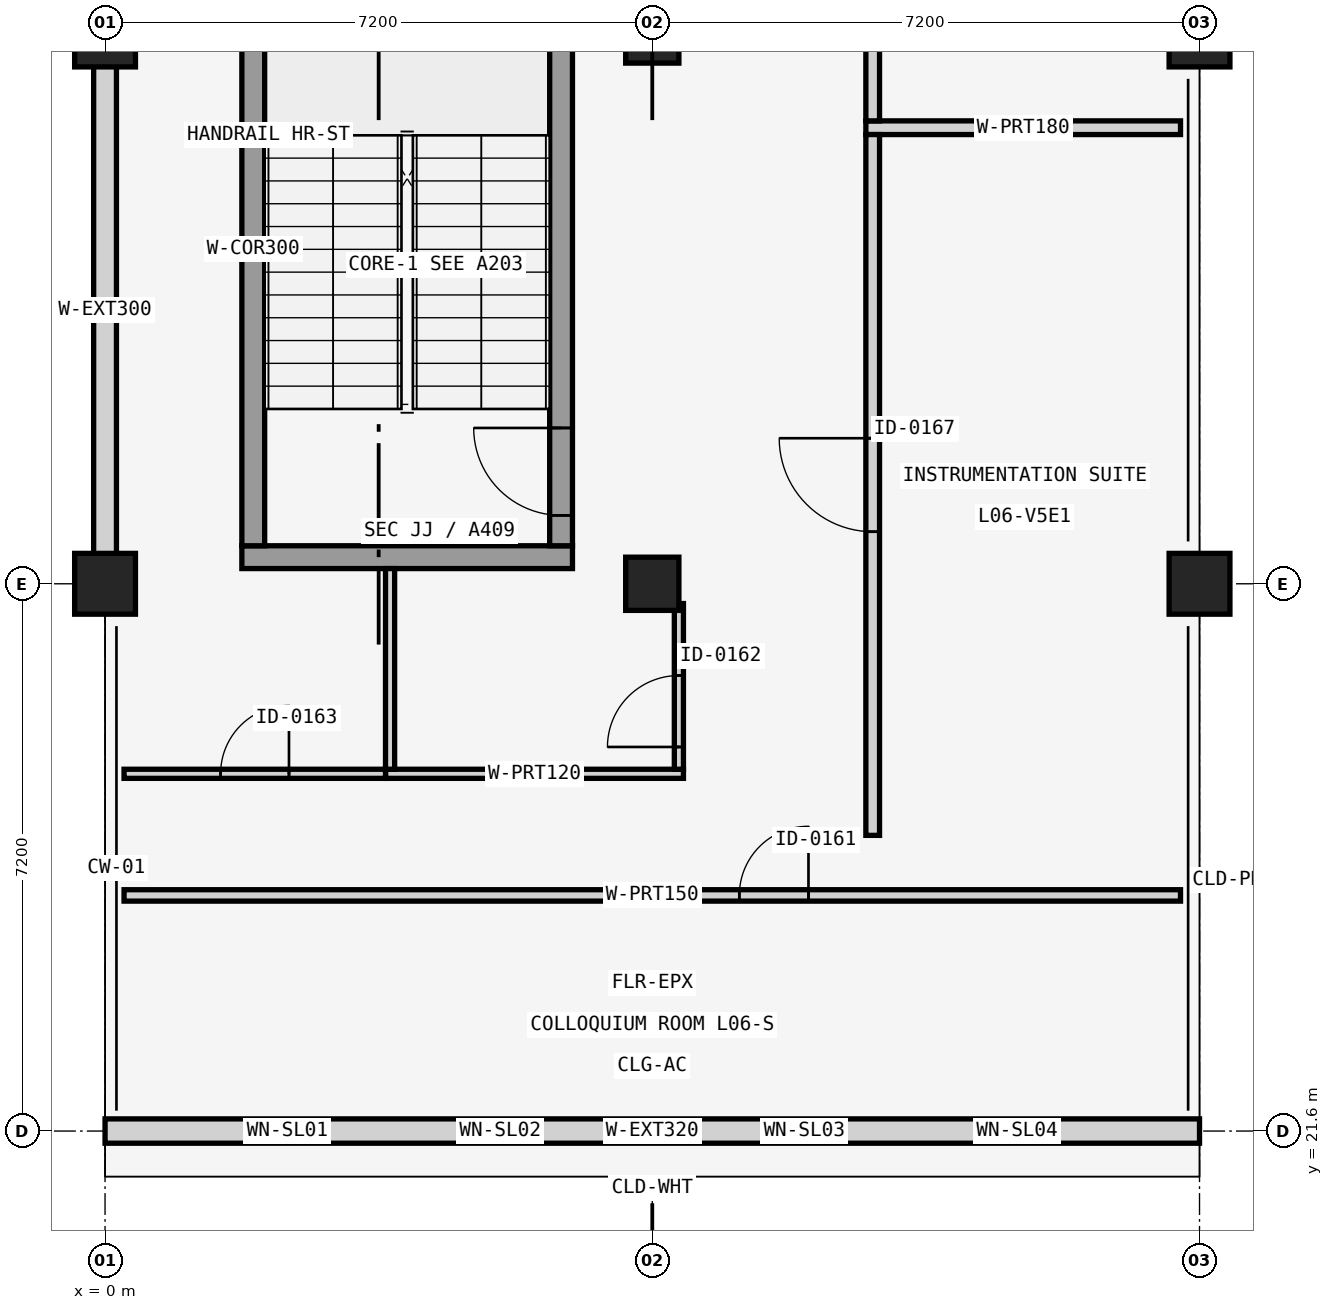
"""IFC4 building model, lengths in metres.
Left out: names, types, materials, properties, quantities, classifications, styles, units other than length and angle.
Written with IfcOpenShell. Run it as: python <this file> out.ifc"""

import sys

from ifc_helpers import new_model, si_unit, direction, frame, frame_2d, origin, origin_2d, place, context, subcontext, project, spatial, rectangle, extrude, element, fill, save


model = new_model("IFC4")
c1 = context("Model", 3, precision=1e-05, world=origin(), true_north=direction((0.0, 1.0)))
c2 = subcontext(c1, "Body", "Model", "MODEL_VIEW")
j1 = project(units=[si_unit("LENGTHUNIT", "METRE"), si_unit("PLANEANGLEUNIT", "RADIAN")], contexts=[c1])
p1 = place(None, origin())
s1 = spatial("IfcSite", under=j1, at=p1, CompositionType="ELEMENT")
p2 = place(p1, origin())
s2 = spatial("IfcBuilding", under=s1, at=p2, CompositionType="ELEMENT")
p3 = place(p2, frame((0.0, 0.0, 25.6)))
s3 = spatial("IfcBuildingStorey", under=s2, at=p3, CompositionType="ELEMENT", Elevation=25.6)
for number, where, z_axis, x_axis in (
    (1, (0.0, 28.8, 0.0), (0.0, 0.0, 1.0), (1.0, 0.0, 0.0)),
    (2, (0.0, 36.0, 0.0), (0.0, 0.0, 1.0), (1.0, 0.0, 0.0)),
):
    element("IfcColumn", number, at=place(p3, frame(where, z_axis=z_axis, x_axis=x_axis)), inside=s3, PredefinedType="COLUMN", context=c2, shape_type="SweptSolid", body=[
        extrude(rectangle(XDim=0.8, YDim=0.8, at=origin_2d()), origin(), (0.0, 0.0, 1.0), 4.16),
    ])
for number, where, z_axis, x_axis in (
    (3, (7.2, 28.8, 0.0), (0.0, 0.0, 1.0), (1.0, 0.0, 0.0)),
    (4, (7.2, 36.0, 0.0), (0.0, 0.0, 1.0), (1.0, 0.0, 0.0)),
):
    element("IfcColumn", number, at=place(p3, frame(where, z_axis=z_axis, x_axis=x_axis)), inside=s3, PredefinedType="COLUMN", context=c2, shape_type="SweptSolid", body=[
        extrude(rectangle(XDim=0.7, YDim=0.7, at=origin_2d()), origin(), (0.0, 0.0, 1.0), 4.16),
    ])
for number, where, z_axis, x_axis in (
    (5, (14.4, 28.8, 0.0), (0.0, 0.0, 1.0), (1.0, 0.0, 0.0)),
    (6, (14.4, 36.0, 0.0), (0.0, 0.0, 1.0), (1.0, 0.0, 0.0)),
):
    element("IfcColumn", number, at=place(p3, frame(where, z_axis=z_axis, x_axis=x_axis)), inside=s3, PredefinedType="COLUMN", context=c2, shape_type="SweptSolid", body=[
        extrude(rectangle(XDim=0.8, YDim=0.8, at=origin_2d()), origin(), (0.0, 0.0, 1.0), 4.16),
    ])
p4 = place(p3, frame((0.0, 21.6, 0.0), z_axis=(0.0, 0.0, 1.0), x_axis=(1.0, 0.0, 0.0)))
e7 = element("IfcWall", 7, at=p4, inside=s3, PredefinedType="SOLIDWALL", context=c2, shape_type="SweptSolid", body=[
    extrude(rectangle(XDim=14.4, YDim=0.32, at=frame_2d((7.2, 0.0))), origin(), (0.0, 0.0, 1.0), 3.01),
])
p5 = place(p4, frame((2.175, 0.0, 0.45)))
e8 = element("IfcOpeningElement", 8, at=p5, cuts=e7, PredefinedType="OPENING", context=c2, shape_type="SweptSolid", body=[
    extrude(rectangle(XDim=0.45, YDim=2.4, at=frame_2d((0.225, 1.2))), frame((0.0, 0.17, 0.0), z_axis=(0.0, -1.0, 0.0), x_axis=(1.0, 0.0, 0.0)), (0.0, 0.0, 1.0), 0.34),
])
p6 = place(p4, frame((4.95, 0.0, 0.45)))
e9 = element("IfcOpeningElement", 9, at=p6, cuts=e7, PredefinedType="OPENING", context=c2, shape_type="SweptSolid", body=[
    extrude(rectangle(XDim=0.5, YDim=2.4, at=frame_2d((0.25, 1.2))), frame((0.0, 0.17, 0.0), z_axis=(0.0, -1.0, 0.0), x_axis=(1.0, 0.0, 0.0)), (0.0, 0.0, 1.0), 0.34),
])
p7 = place(p4, frame((8.925, 0.0, 0.65)))
e10 = element("IfcOpeningElement", 10, at=p7, cuts=e7, PredefinedType="OPENING", context=c2, shape_type="SweptSolid", body=[
    extrude(rectangle(XDim=0.55, YDim=2.2, at=frame_2d((0.275, 1.1))), frame((0.0, 0.17, 0.0), z_axis=(0.0, -1.0, 0.0), x_axis=(1.0, 0.0, 0.0)), (0.0, 0.0, 1.0), 0.34),
])
p8 = place(p4, frame((11.775, 0.0, 0.75)))
e11 = element("IfcOpeningElement", 11, at=p8, cuts=e7, PredefinedType="OPENING", context=c2, shape_type="SweptSolid", body=[
    extrude(rectangle(XDim=0.45, YDim=2.1, at=frame_2d((0.225, 1.05))), frame((0.0, 0.17, 0.0), z_axis=(0.0, -1.0, 0.0), x_axis=(1.0, 0.0, 0.0)), (0.0, 0.0, 1.0), 0.34),
])
p9 = place(p3, frame((0.0, 29.19, 0.0), z_axis=(0.0, 0.0, 1.0), x_axis=(0.0, 1.0, 0.0)))
e12 = element("IfcWall", 12, at=p9, inside=s3, PredefinedType="SOLIDWALL", context=c2, shape_type="SweptSolid", body=[
    extrude(rectangle(XDim=6.42, YDim=0.3, at=frame_2d((3.21, 0.0))), origin(), (0.0, 0.0, 1.0), 3.01),
])
p10 = place(p3, frame((1.8, 29.15, 0.0), z_axis=(0.0, 0.0, 1.0), x_axis=(1.0, 0.0, 0.0)))
e13 = element("IfcWall", 13, at=p10, inside=s3, PredefinedType="SHEAR", context=c2, shape_type="SweptSolid", body=[
    extrude(rectangle(XDim=4.35, YDim=0.3, at=frame_2d((2.175, 0.0))), origin(), (0.0, 0.0, 1.0), 3.81),
])
p11 = place(p3, frame((1.95, 29.3, 0.0), z_axis=(0.0, 0.0, 1.0), x_axis=(0.0, 1.0, 0.0)))
e14 = element("IfcWall", 14, at=p11, inside=s3, PredefinedType="SHEAR", context=c2, shape_type="SweptSolid", body=[
    extrude(rectangle(XDim=7.8, YDim=0.3, at=frame_2d((3.9, 0.0))), origin(), (0.0, 0.0, 1.0), 3.81),
])
p12 = place(p3, frame((6.0, 29.3, 0.0), z_axis=(0.0, 0.0, 1.0), x_axis=(0.0, 1.0, 0.0)))
e15 = element("IfcWall", 15, at=p12, inside=s3, PredefinedType="SHEAR", context=c2, shape_type="SweptSolid", body=[
    extrude(rectangle(XDim=7.8, YDim=0.3, at=frame_2d((3.9, 0.0))), origin(), (0.0, 0.0, 1.0), 3.81),
])
p13 = place(p12, frame((0.4, 0.0, 0.0)))
e16 = element("IfcOpeningElement", 16, at=p13, cuts=e15, PredefinedType="OPENING", context=c2, shape_type="SweptSolid", body=[
    extrude(rectangle(XDim=1.15, YDim=2.2, at=frame_2d((0.575, 1.1))), frame((0.0, 0.16, 0.0), z_axis=(0.0, -1.0, 0.0), x_axis=(1.0, 0.0, 0.0)), (0.0, 0.0, 1.0), 0.32),
])
p14 = place(p3, frame((0.25, 24.7, 0.0), z_axis=(0.0, 0.0, 1.0), x_axis=(1.0, 0.0, 0.0)))
e17 = element("IfcWall", 17, at=p14, inside=s3, PredefinedType="PARTITIONING", context=c2, shape_type="SweptSolid", body=[
    extrude(rectangle(XDim=13.9, YDim=0.15, at=frame_2d((6.95, 0.0))), origin(), (0.0, 0.0, 1.0), 3.01),
])
p15 = place(p14, frame((8.095, 0.0, 0.0)))
e18 = element("IfcOpeningElement", 18, at=p15, cuts=e17, PredefinedType="OPENING", context=c2, shape_type="SweptSolid", body=[
    extrude(rectangle(XDim=0.91, YDim=2.08, at=frame_2d((0.455, 1.04))), frame((0.0, 0.085, 0.0), z_axis=(0.0, -1.0, 0.0), x_axis=(1.0, 0.0, 0.0)), (0.0, 0.0, 1.0), 0.17),
])
p16 = place(p3, frame((3.69, 26.3, 0.0), z_axis=(0.0, 0.0, 1.0), x_axis=(1.0, 0.0, 0.0)))
e19 = element("IfcWall", 19, at=p16, inside=s3, PredefinedType="PARTITIONING", context=c2, shape_type="SweptSolid", body=[
    extrude(rectangle(XDim=3.92, YDim=0.12, at=frame_2d((1.96, 0.0))), origin(), (0.0, 0.0, 1.0), 3.01),
])
p17 = place(p3, frame((3.75, 26.36, 0.0), z_axis=(0.0, 0.0, 1.0), x_axis=(0.0, 1.0, 0.0)))
e20 = element("IfcWall", 20, at=p17, inside=s3, PredefinedType="PARTITIONING", context=c2, shape_type="SweptSolid", body=[
    extrude(rectangle(XDim=2.64, YDim=0.12, at=frame_2d((1.32, 0.0))), origin(), (0.0, 0.0, 1.0), 3.21),
])
p18 = place(p3, frame((7.55, 26.36, 0.0), z_axis=(0.0, 0.0, 1.0), x_axis=(0.0, 1.0, 0.0)))
e21 = element("IfcWall", 21, at=p18, inside=s3, PredefinedType="PARTITIONING", context=c2, shape_type="SweptSolid", body=[
    extrude(rectangle(XDim=2.18, YDim=0.12, at=frame_2d((1.09, 0.0))), origin(), (0.0, 0.0, 1.0), 3.81),
])
p19 = place(p18, frame((0.293, 0.0, 0.0)))
e22 = element("IfcOpeningElement", 22, at=p19, cuts=e21, PredefinedType="OPENING", context=c2, shape_type="SweptSolid", body=[
    extrude(rectangle(XDim=0.94, YDim=2.1, at=frame_2d((0.47, 1.05))), frame((0.0, 0.07, 0.0), z_axis=(0.0, -1.0, 0.0), x_axis=(1.0, 0.0, 0.0)), (0.0, 0.0, 1.0), 0.14),
])
p20 = place(p3, frame((0.25, 26.3, 0.0), z_axis=(0.0, 0.0, 1.0), x_axis=(1.0, 0.0, 0.0)))
e23 = element("IfcWall", 23, at=p20, inside=s3, PredefinedType="PARTITIONING", context=c2, shape_type="SweptSolid", body=[
    extrude(rectangle(XDim=3.44, YDim=0.12, at=frame_2d((1.72, 0.0))), origin(), (0.0, 0.0, 1.0), 3.81),
])
p21 = place(p20, frame((1.27, 0.0, 0.0)))
e24 = element("IfcOpeningElement", 24, at=p21, cuts=e23, PredefinedType="OPENING", context=c2, shape_type="SweptSolid", body=[
    extrude(rectangle(XDim=0.9, YDim=2.1, at=frame_2d((0.45, 1.05))), frame((0.0, 0.07, 0.0), z_axis=(0.0, -1.0, 0.0), x_axis=(1.0, 0.0, 0.0)), (0.0, 0.0, 1.0), 0.14),
])
p22 = place(p3, frame((10.01, 34.8, 0.0), z_axis=(0.0, 0.0, 1.0), x_axis=(1.0, 0.0, 0.0)))
e25 = element("IfcWall", 25, at=p22, inside=s3, PredefinedType="PARTITIONING", context=c2, shape_type="SweptSolid", body=[
    extrude(rectangle(XDim=4.14, YDim=0.18, at=frame_2d((2.07, 0.0))), origin(), (0.0, 0.0, 1.0), 3.81),
])
p23 = place(p3, frame((10.1, 25.49, 0.0), z_axis=(0.0, 0.0, 1.0), x_axis=(0.0, 1.0, 0.0)))
e26 = element("IfcWall", 26, at=p23, inside=s3, PredefinedType="PARTITIONING", context=c2, shape_type="SweptSolid", body=[
    extrude(rectangle(XDim=9.22, YDim=0.18, at=frame_2d((4.61, 0.0))), origin(), (0.0, 0.0, 1.0), 3.21),
])
p24 = place(p23, frame((3.995, 0.0, 0.0)))
e27 = element("IfcOpeningElement", 27, at=p24, cuts=e26, PredefinedType="OPENING", context=c2, shape_type="SweptSolid", body=[
    extrude(rectangle(XDim=1.23, YDim=2.12, at=frame_2d((0.615, 1.06))), frame((0.0, 0.1, 0.0), z_axis=(0.0, -1.0, 0.0), x_axis=(1.0, 0.0, 0.0)), (0.0, 0.0, 1.0), 0.2),
])
p25 = place(p3, frame((10.1, 34.89, 0.0), z_axis=(0.0, 0.0, 1.0), x_axis=(0.0, 1.0, 0.0)))
e28 = element("IfcWall", 28, at=p25, inside=s3, PredefinedType="PARTITIONING", context=c2, shape_type="SweptSolid", body=[
    extrude(rectangle(XDim=14.22, YDim=0.18, at=frame_2d((7.11, 0.0))), origin(), (0.0, 0.0, 1.0), 3.21),
])
p26 = place(p25, frame((6.47, 0.0, 0.0)))
e29 = element("IfcOpeningElement", 29, at=p26, cuts=e28, PredefinedType="OPENING", context=c2, shape_type="SweptSolid", body=[
    extrude(rectangle(XDim=1.28, YDim=2.12, at=frame_2d((0.64, 1.06))), frame((0.0, 0.1, 0.0), z_axis=(0.0, -1.0, 0.0), x_axis=(1.0, 0.0, 0.0)), (0.0, 0.0, 1.0), 0.2),
])
p27 = place(p5, origin())
e30 = element("IfcWindow", 30, at=p27, inside=s3, PartitioningType="SINGLE_PANEL", PredefinedType="WINDOW", context=c2, shape_type="SweptSolid", body=[
    extrude(rectangle(XDim=0.45, YDim=2.4, at=frame_2d((0.225, 1.2))), frame((0.0, 0.03, 0.0), z_axis=(0.0, -1.0, 0.0), x_axis=(1.0, 0.0, 0.0)), (0.0, 0.0, 1.0), 0.06),
])
fill(e8, e30)
p28 = place(p6, origin())
e31 = element("IfcWindow", 31, at=p28, inside=s3, PartitioningType="SINGLE_PANEL", PredefinedType="WINDOW", context=c2, shape_type="SweptSolid", body=[
    extrude(rectangle(XDim=0.5, YDim=2.4, at=frame_2d((0.25, 1.2))), frame((0.0, 0.03, 0.0), z_axis=(0.0, -1.0, 0.0), x_axis=(1.0, 0.0, 0.0)), (0.0, 0.0, 1.0), 0.06),
])
fill(e9, e31)
p29 = place(p7, origin())
e32 = element("IfcWindow", 32, at=p29, inside=s3, PartitioningType="SINGLE_PANEL", PredefinedType="WINDOW", context=c2, shape_type="SweptSolid", body=[
    extrude(rectangle(XDim=0.55, YDim=2.2, at=frame_2d((0.275, 1.1))), frame((0.0, 0.03, 0.0), z_axis=(0.0, -1.0, 0.0), x_axis=(1.0, 0.0, 0.0)), (0.0, 0.0, 1.0), 0.06),
])
fill(e10, e32)
p30 = place(p8, origin())
e33 = element("IfcWindow", 33, at=p30, inside=s3, PartitioningType="SINGLE_PANEL", PredefinedType="WINDOW", context=c2, shape_type="SweptSolid", body=[
    extrude(rectangle(XDim=0.45, YDim=2.1, at=frame_2d((0.225, 1.05))), frame((0.0, 0.03, 0.0), z_axis=(0.0, -1.0, 0.0), x_axis=(1.0, 0.0, 0.0)), (0.0, 0.0, 1.0), 0.06),
])
fill(e11, e33)
p31 = place(p13, origin())
e34 = element("IfcDoor", 34, at=p31, inside=s3, OperationType="SINGLE_SWING_RIGHT", PredefinedType="DOOR", context=c2, shape_type="SweptSolid", body=[
    extrude(rectangle(XDim=1.15, YDim=2.2, at=frame_2d((0.575, 1.1))), frame((0.0, 0.025, 0.0), z_axis=(0.0, -1.0, 0.0), x_axis=(1.0, 0.0, 0.0)), (0.0, 0.0, 1.0), 0.05),
])
fill(e16, e34)
p32 = place(p15, origin())
e35 = element("IfcDoor", 35, at=p32, inside=s3, OperationType="SINGLE_SWING_RIGHT", PredefinedType="DOOR", context=c2, shape_type="SweptSolid", body=[
    extrude(rectangle(XDim=0.91, YDim=2.08, at=frame_2d((0.455, 1.04))), frame((0.0, 0.025, 0.0), z_axis=(0.0, -1.0, 0.0), x_axis=(1.0, 0.0, 0.0)), (0.0, 0.0, 1.0), 0.05),
])
fill(e18, e35)
p33 = place(p19, frame((0.94, 0.0, 0.0), z_axis=(0.0, 0.0, 1.0), x_axis=(-1.0, 0.0, 0.0)))
e36 = element("IfcDoor", 36, at=p33, inside=s3, OperationType="SINGLE_SWING_LEFT", PredefinedType="DOOR", context=c2, shape_type="SweptSolid", body=[
    extrude(rectangle(XDim=0.94, YDim=2.1, at=frame_2d((0.47, 1.05))), frame((0.0, 0.025, 0.0), z_axis=(0.0, -1.0, 0.0), x_axis=(1.0, 0.0, 0.0)), (0.0, 0.0, 1.0), 0.05),
])
fill(e22, e36)
p34 = place(p21, origin())
e37 = element("IfcDoor", 37, at=p34, inside=s3, OperationType="SINGLE_SWING_RIGHT", PredefinedType="DOOR", context=c2, shape_type="SweptSolid", body=[
    extrude(rectangle(XDim=0.9, YDim=2.1, at=frame_2d((0.45, 1.05))), frame((0.0, 0.025, 0.0), z_axis=(0.0, -1.0, 0.0), x_axis=(1.0, 0.0, 0.0)), (0.0, 0.0, 1.0), 0.05),
])
fill(e24, e37)
p35 = place(p24, origin())
e38 = element("IfcDoor", 38, at=p35, inside=s3, OperationType="SINGLE_SWING_RIGHT", PredefinedType="DOOR", context=c2, shape_type="SweptSolid", body=[
    extrude(rectangle(XDim=1.23, YDim=2.12, at=frame_2d((0.615, 1.06))), frame((0.0, 0.025, 0.0), z_axis=(0.0, -1.0, 0.0), x_axis=(1.0, 0.0, 0.0)), (0.0, 0.0, 1.0), 0.05),
])
fill(e27, e38)
save(model, sys.argv[1])
